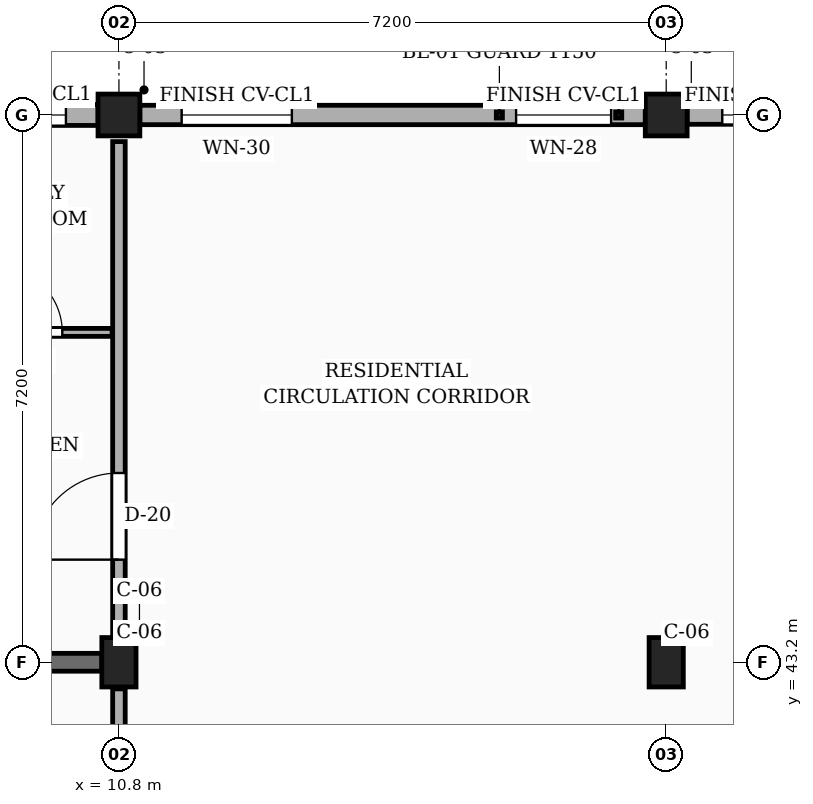
"""IFC4 building model, lengths in metres.
Left out: names, types, materials, properties, quantities, classifications, styles, units other than length and angle.
Written with IfcOpenShell. Run it as: python <this file> out.ifc"""

import sys

from ifc_helpers import new_model, si_unit, direction, frame, frame_2d, origin, origin_2d, place, context, subcontext, project, spatial, rectangle, extrude, element, fill, save


model = new_model("IFC4")
c1 = context("Model", 3, precision=1e-05, world=origin(), true_north=direction((0.0, 1.0)))
c2 = subcontext(c1, "Body", "Model", "MODEL_VIEW")
j1 = project(units=[si_unit("LENGTHUNIT", "METRE"), si_unit("PLANEANGLEUNIT", "RADIAN")], contexts=[c1])
p1 = place(None, origin())
s1 = spatial("IfcSite", under=j1, at=p1, CompositionType="ELEMENT")
p2 = place(p1, origin())
s2 = spatial("IfcBuilding", under=s1, at=p2, CompositionType="ELEMENT")
p3 = place(p2, frame((0.0, 0.0, 13.95)))
s3 = spatial("IfcBuildingStorey", under=s2, at=p3, CompositionType="ELEMENT", Elevation=13.95)
p4 = place(p3, frame((10.8, 43.2, 0.0), z_axis=(0.0, 0.0, 1.0), x_axis=(1.0, 0.0, 0.0)))
e1 = element("IfcColumn", 1, at=p4, inside=s3, PredefinedType="COLUMN", context=c2, shape_type="SweptSolid", body=[
    extrude(rectangle(XDim=0.45, YDim=0.65, at=origin_2d()), origin(), (0.0, 0.0, 1.0), 3.15),
])
p5 = place(p3, frame((10.8, 50.4, 0.0), z_axis=(0.0, 0.0, 1.0), x_axis=(1.0, 0.0, 0.0)))
e2 = element("IfcColumn", 2, at=p5, inside=s3, PredefinedType="COLUMN", context=c2, shape_type="SweptSolid", body=[
    extrude(rectangle(XDim=0.55, YDim=0.55, at=origin_2d()), origin(), (0.0, 0.0, 1.0), 3.15),
])
p6 = place(p3, frame((18.0, 43.2, 0.0), z_axis=(0.0, 0.0, 1.0), x_axis=(1.0, 0.0, 0.0)))
e3 = element("IfcColumn", 3, at=p6, inside=s3, PredefinedType="COLUMN", context=c2, shape_type="SweptSolid", body=[
    extrude(rectangle(XDim=0.45, YDim=0.65, at=origin_2d()), origin(), (0.0, 0.0, 1.0), 3.15),
])
p7 = place(p3, frame((18.0, 50.4, 0.0), z_axis=(0.0, 0.0, 1.0), x_axis=(1.0, 0.0, 0.0)))
e4 = element("IfcColumn", 4, at=p7, inside=s3, PredefinedType="COLUMN", context=c2, shape_type="SweptSolid", body=[
    extrude(rectangle(XDim=0.55, YDim=0.55, at=origin_2d()), origin(), (0.0, 0.0, 1.0), 3.15),
])
p8 = place(p3, frame((3.875, 43.2, 0.0), z_axis=(0.0, 0.0, 1.0), x_axis=(1.0, 0.0, 0.0)))
e5 = element("IfcWall", 5, at=p8, inside=s3, PredefinedType="SOLIDWALL", context=c2, shape_type="SweptSolid", body=[
    extrude(rectangle(XDim=6.7, YDim=0.235, at=frame_2d((3.35, 0.0))), origin(), (0.0, 0.0, 1.0), 2.17),
])
p9 = place(p3, frame((24.925, 50.4, 0.0), z_axis=(0.0, 0.0, 1.0), x_axis=(-1.0, 0.0, 0.0)))
e6 = element("IfcWall", 6, at=p9, inside=s3, PredefinedType="SOLIDWALL", context=c2, shape_type="SweptSolid", body=[
    extrude(rectangle(XDim=6.65, YDim=0.245, at=frame_2d((3.325, 0.0))), origin(), (0.0, 0.0, 1.0), 2.44),
])
p10 = place(p9, frame((1.985, 0.0, 0.78)))
e7 = element("IfcOpeningElement", 7, at=p10, cuts=e6, PredefinedType="OPENING", context=c2, shape_type="SweptSolid", body=[
    extrude(rectangle(XDim=1.05, YDim=1.44, at=frame_2d((0.525, 0.72))), frame((0.0, 0.133, 0.0), z_axis=(0.0, -1.0, 0.0), x_axis=(1.0, 0.0, 0.0)), (0.0, 0.0, 1.0), 0.265),
])
p11 = place(p9, frame((5.147, 0.0, 0.78)))
e8 = element("IfcOpeningElement", 8, at=p11, cuts=e6, PredefinedType="OPENING", context=c2, shape_type="SweptSolid", body=[
    extrude(rectangle(XDim=1.04, YDim=1.26, at=frame_2d((0.52, 0.63))), frame((0.0, 0.133, 0.0), z_axis=(0.0, -1.0, 0.0), x_axis=(1.0, 0.0, 0.0)), (0.0, 0.0, 1.0), 0.265),
])
p12 = place(p3, frame((17.725, 50.4, 0.0), z_axis=(0.0, 0.0, 1.0), x_axis=(-1.0, 0.0, 0.0)))
e9 = element("IfcWall", 9, at=p12, inside=s3, PredefinedType="SOLIDWALL", context=c2, shape_type="SweptSolid", body=[
    extrude(rectangle(XDim=6.65, YDim=0.255, at=frame_2d((3.325, 0.0))), origin(), (0.0, 0.0, 1.0), 2.44),
])
p13 = place(p12, frame((0.45, 0.0, 0.78)))
e10 = element("IfcOpeningElement", 10, at=p13, cuts=e9, PredefinedType="OPENING", context=c2, shape_type="SweptSolid", body=[
    extrude(rectangle(XDim=1.25, YDim=1.44, at=frame_2d((0.625, 0.72))), frame((0.0, 0.137, 0.0), z_axis=(0.0, -1.0, 0.0), x_axis=(1.0, 0.0, 0.0)), (0.0, 0.0, 1.0), 0.275),
])
p14 = place(p12, frame((4.65, 0.0, 0.78)))
e11 = element("IfcOpeningElement", 11, at=p14, cuts=e9, PredefinedType="OPENING", context=c2, shape_type="SweptSolid", body=[
    extrude(rectangle(XDim=1.45, YDim=1.44, at=frame_2d((0.725, 0.72))), frame((0.0, 0.137, 0.0), z_axis=(0.0, -1.0, 0.0), x_axis=(1.0, 0.0, 0.0)), (0.0, 0.0, 1.0), 0.275),
])
p15 = place(p3, frame((10.525, 50.4, 0.0), z_axis=(0.0, 0.0, 1.0), x_axis=(-1.0, 0.0, 0.0)))
e12 = element("IfcWall", 12, at=p15, inside=s3, PredefinedType="SOLIDWALL", context=c2, shape_type="SweptSolid", body=[
    extrude(rectangle(XDim=6.65, YDim=0.275, at=frame_2d((3.325, 0.0))), origin(), (0.0, 0.0, 1.0), 2.44),
])
p16 = place(p15, frame((0.423, 0.0, 0.78)))
e13 = element("IfcOpeningElement", 13, at=p16, cuts=e12, PredefinedType="OPENING", context=c2, shape_type="SweptSolid", body=[
    extrude(rectangle(XDim=1.36, YDim=1.26, at=frame_2d((0.68, 0.63))), frame((0.0, 0.147, 0.0), z_axis=(0.0, -1.0, 0.0), x_axis=(1.0, 0.0, 0.0)), (0.0, 0.0, 1.0), 0.295),
])
p17 = place(p15, frame((3.827, 0.0, 0.78)))
e14 = element("IfcOpeningElement", 14, at=p17, cuts=e12, PredefinedType="OPENING", context=c2, shape_type="SweptSolid", body=[
    extrude(rectangle(XDim=0.92, YDim=1.15, at=frame_2d((0.46, 0.575))), frame((0.0, 0.147, 0.0), z_axis=(0.0, -1.0, 0.0), x_axis=(1.0, 0.0, 0.0)), (0.0, 0.0, 1.0), 0.295),
])
p18 = place(p3, frame((10.8, 36.35, 0.0), z_axis=(0.0, 0.0, 1.0), x_axis=(0.0, 1.0, 0.0)))
e15 = element("IfcWall", 15, at=p18, inside=s3, PredefinedType="PARTITIONING", context=c2, shape_type="SweptSolid", body=[
    extrude(rectangle(XDim=6.5, YDim=0.165, at=frame_2d((3.25, 0.0))), origin(), (0.0, 0.0, 1.0), 2.305),
])
p19 = place(p18, frame((1.0, 0.0, 0.0)))
e16 = element("IfcOpeningElement", 16, at=p19, cuts=e15, PredefinedType="OPENING", context=c2, shape_type="SweptSolid", body=[
    extrude(rectangle(XDim=0.94, YDim=2.12, at=frame_2d((0.47, 1.06))), frame((0.0, 0.093, 0.0), z_axis=(0.0, -1.0, 0.0), x_axis=(1.0, 0.0, 0.0)), (0.0, 0.0, 1.0), 0.185),
])
p20 = place(p3, frame((10.8, 43.55, 0.0), z_axis=(0.0, 0.0, 1.0), x_axis=(0.0, 1.0, 0.0)))
e17 = element("IfcWall", 17, at=p20, inside=s3, PredefinedType="PARTITIONING", context=c2, shape_type="SweptSolid", body=[
    extrude(rectangle(XDim=6.5, YDim=0.165, at=frame_2d((3.25, 0.0))), origin(), (0.0, 0.0, 1.0), 2.305),
])
p21 = place(p20, frame((1.0, 0.0, 0.0)))
e18 = element("IfcOpeningElement", 18, at=p21, cuts=e17, PredefinedType="OPENING", context=c2, shape_type="SweptSolid", body=[
    extrude(rectangle(XDim=1.14, YDim=2.18, at=frame_2d((0.57, 1.09))), frame((0.0, 0.093, 0.0), z_axis=(0.0, -1.0, 0.0), x_axis=(1.0, 0.0, 0.0)), (0.0, 0.0, 1.0), 0.185),
])
p22 = place(p3, frame((8.53, 47.54, 0.0), z_axis=(0.0, 0.0, 1.0), x_axis=(1.0, 0.0, 0.0)))
e19 = element("IfcWall", 19, at=p22, inside=s3, PredefinedType="PARTITIONING", context=c2, shape_type="SweptSolid", body=[
    extrude(rectangle(XDim=2.18, YDim=0.105, at=frame_2d((1.09, 0.0))), origin(), (0.0, 0.0, 1.0), 2.305),
])
p23 = place(p22, frame((0.655, 0.0, 0.0)))
e20 = element("IfcOpeningElement", 20, at=p23, cuts=e19, PredefinedType="OPENING", context=c2, shape_type="SweptSolid", body=[
    extrude(rectangle(XDim=0.87, YDim=2.05, at=frame_2d((0.435, 1.025))), frame((0.0, 0.062, 0.0), z_axis=(0.0, -1.0, 0.0), x_axis=(1.0, 0.0, 0.0)), (0.0, 0.0, 1.0), 0.125),
])
p24 = place(p11, origin())
e21 = element("IfcWindow", 21, at=p24, inside=s3, PartitioningType="SINGLE_PANEL", PredefinedType="WINDOW", context=c2, shape_type="SweptSolid", body=[
    extrude(rectangle(XDim=1.04, YDim=1.26, at=frame_2d((0.52, 0.63))), frame((0.0, 0.03, 0.0), z_axis=(0.0, -1.0, 0.0), x_axis=(1.0, 0.0, 0.0)), (0.0, 0.0, 1.0), 0.06),
])
fill(e8, e21)
p25 = place(p13, origin())
e22 = element("IfcWindow", 22, at=p25, inside=s3, PartitioningType="SINGLE_PANEL", PredefinedType="WINDOW", context=c2, shape_type="SweptSolid", body=[
    extrude(rectangle(XDim=1.25, YDim=1.44, at=frame_2d((0.625, 0.72))), frame((0.0, 0.03, 0.0), z_axis=(0.0, -1.0, 0.0), x_axis=(1.0, 0.0, 0.0)), (0.0, 0.0, 1.0), 0.06),
])
fill(e10, e22)
p26 = place(p14, origin())
e23 = element("IfcWindow", 23, at=p26, inside=s3, PartitioningType="SINGLE_PANEL", PredefinedType="WINDOW", context=c2, shape_type="SweptSolid", body=[
    extrude(rectangle(XDim=1.45, YDim=1.44, at=frame_2d((0.725, 0.72))), frame((0.0, 0.03, 0.0), z_axis=(0.0, -1.0, 0.0), x_axis=(1.0, 0.0, 0.0)), (0.0, 0.0, 1.0), 0.06),
])
fill(e11, e23)
p27 = place(p16, origin())
e24 = element("IfcWindow", 24, at=p27, inside=s3, PartitioningType="SINGLE_PANEL", PredefinedType="WINDOW", context=c2, shape_type="SweptSolid", body=[
    extrude(rectangle(XDim=1.36, YDim=1.26, at=frame_2d((0.68, 0.63))), frame((0.0, 0.03, 0.0), z_axis=(0.0, -1.0, 0.0), x_axis=(1.0, 0.0, 0.0)), (0.0, 0.0, 1.0), 0.06),
])
fill(e13, e24)
p28 = place(p21, origin())
e25 = element("IfcDoor", 25, at=p28, inside=s3, OperationType="SINGLE_SWING_LEFT", PredefinedType="DOOR", context=c2, shape_type="SweptSolid", body=[
    extrude(rectangle(XDim=1.14, YDim=2.18, at=frame_2d((0.57, 1.09))), frame((0.0, 0.025, 0.0), z_axis=(0.0, -1.0, 0.0), x_axis=(1.0, 0.0, 0.0)), (0.0, 0.0, 1.0), 0.05),
])
fill(e18, e25)
p29 = place(p23, origin())
e26 = element("IfcDoor", 26, at=p29, inside=s3, OperationType="SINGLE_SWING_LEFT", PredefinedType="DOOR", context=c2, shape_type="SweptSolid", body=[
    extrude(rectangle(XDim=0.87, YDim=2.05, at=frame_2d((0.435, 1.025))), frame((0.0, 0.025, 0.0), z_axis=(0.0, -1.0, 0.0), x_axis=(1.0, 0.0, 0.0)), (0.0, 0.0, 1.0), 0.05),
])
fill(e20, e26)
save(model, sys.argv[1])
